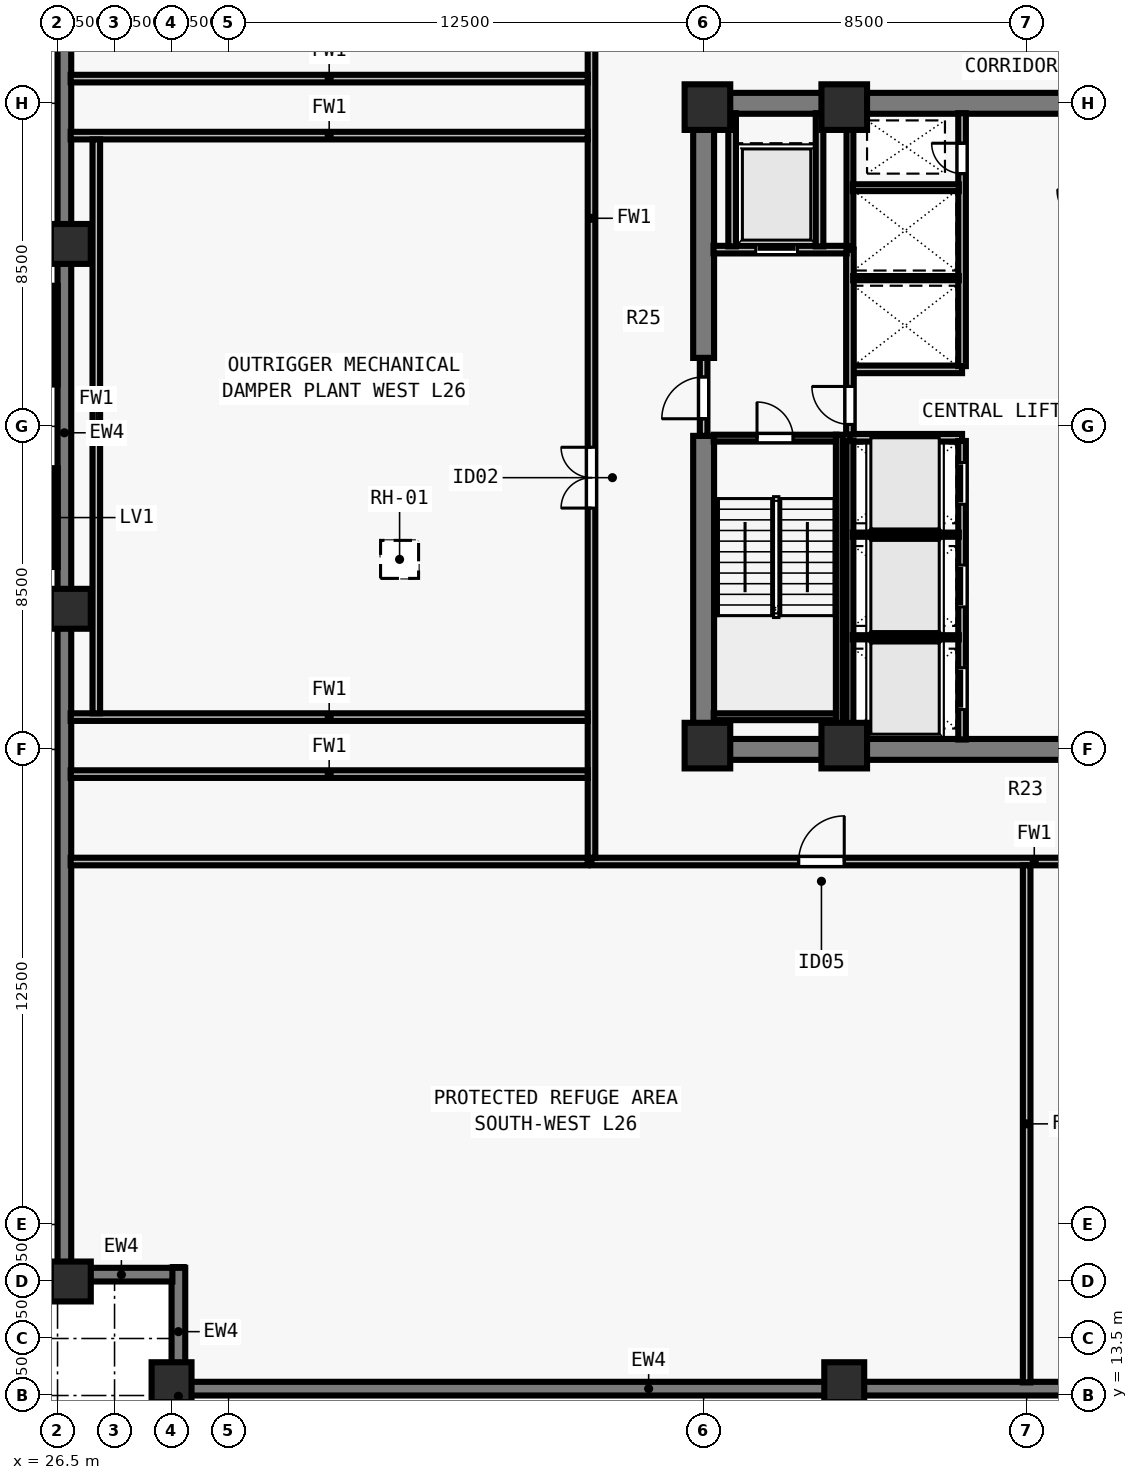
"""IFC4 building model, lengths in metres.
Left out: names, types, materials, properties, quantities, classifications, styles, units other than length and angle.
Written with IfcOpenShell. Run it as: python <this file> out.ifc"""

import sys

from ifc_helpers import new_model, si_unit, direction, frame, frame_2d, origin, origin_2d, place, context, subcontext, project, spatial, rectangle, extrude, element, fill, save


model = new_model("IFC4")
c1 = context("Model", 3, precision=1e-05, world=origin(), true_north=direction((0.0, 1.0)))
c2 = subcontext(c1, "Body", "Model", "MODEL_VIEW")
j1 = project(units=[si_unit("LENGTHUNIT", "METRE"), si_unit("PLANEANGLEUNIT", "RADIAN")], contexts=[c1])
p1 = place(None, origin())
s1 = spatial("IfcSite", under=j1, at=p1, CompositionType="ELEMENT")
p2 = place(p1, origin())
s2 = spatial("IfcBuilding", under=s1, at=p2, CompositionType="ELEMENT")
p3 = place(p2, frame((0.0, 0.0, 97.0)))
s3 = spatial("IfcBuildingStorey", under=s2, at=p3, CompositionType="ELEMENT", Elevation=97.0)
for number, where, z_axis, x_axis in (
    (1, (43.6, 30.6, 0.0), (0.0, 0.0, 1.0), (1.0, 0.0, 0.0)),
    (2, (47.2, 30.6, 0.0), (0.0, 0.0, 1.0), (1.0, 0.0, 0.0)),
    (3, (43.6, 47.4, 0.0), (0.0, 0.0, 1.0), (1.0, 0.0, 0.0)),
    (4, (47.2, 47.4, 0.0), (0.0, 0.0, 1.0), (1.0, 0.0, 0.0)),
):
    element("IfcColumn", number, at=place(p3, frame(where, z_axis=z_axis, x_axis=x_axis)), inside=s3, PredefinedType="COLUMN", context=c2, shape_type="SweptSolid", body=[
        extrude(rectangle(XDim=1.2, YDim=1.2, at=origin_2d()), origin(), (0.0, 0.0, 1.0), 4.5),
    ])
for number, where, z_axis, x_axis in (
    (5, (29.5, 13.85, 0.0), (0.0, 0.0, 1.0), (1.0, 0.0, 0.0)),
    (6, (47.2, 13.85, 0.0), (0.0, 0.0, 1.0), (1.0, 0.0, 0.0)),
    (7, (26.85, 43.8, 0.0), (0.0, 0.0, 1.0), (0.0, 1.0, 0.0)),
    (8, (26.85, 34.2, 0.0), (0.0, 0.0, 1.0), (0.0, 1.0, 0.0)),
    (9, (26.85, 16.5, 0.0), (0.0, 0.0, 1.0), (0.0, 1.0, 0.0)),
):
    element("IfcColumn", number, at=place(p3, frame(where, z_axis=z_axis, x_axis=x_axis)), inside=s3, PredefinedType="COLUMN", context=c2, shape_type="SweptSolid", body=[
        extrude(rectangle(XDim=1.05, YDim=1.05, at=origin_2d()), origin(), (0.0, 0.0, 1.0), 4.5),
    ])
p4 = place(p3, frame((29.68, 13.5, 0.0), z_axis=(0.0, 0.0, 1.0), x_axis=(0.0, 1.0, 0.0)))
e10 = element("IfcWall", 10, at=p4, inside=s3, PredefinedType="SOLIDWALL", context=c2, shape_type="SweptSolid", body=[
    extrude(rectangle(XDim=3.36, YDim=0.36, at=frame_2d((1.68, 0.0))), origin(), (0.0, 0.0, 1.0), 4.28),
])
p5 = place(p3, frame((29.522, 16.68, 0.0), z_axis=(0.0, 0.0, 1.0), x_axis=(-1.0, 0.0, 0.0)))
e11 = element("IfcWall", 11, at=p5, inside=s3, PredefinedType="SOLIDWALL", context=c2, shape_type="SweptSolid", body=[
    extrude(rectangle(XDim=2.684, YDim=0.36, at=frame_2d((1.342, 0.0))), origin(), (0.0, 0.0, 1.0), 4.28),
])
p6 = place(p3, frame((26.68, 16.5, 0.0), z_axis=(0.0, 0.0, 1.0), x_axis=(0.0, 1.0, 0.0)))
e12 = element("IfcWall", 12, at=p6, inside=s3, PredefinedType="SOLIDWALL", context=c2, shape_type="SweptSolid", body=[
    extrude(rectangle(XDim=44.662, YDim=0.36, at=frame_2d((22.331, 0.0))), origin(), (0.0, 0.0, 1.0), 4.28),
])
p7 = place(p3, frame((74.5, 13.68, 0.0), z_axis=(0.0, 0.0, 1.0), x_axis=(-1.0, 0.0, 0.0)))
e13 = element("IfcWall", 13, at=p7, inside=s3, PredefinedType="SOLIDWALL", context=c2, shape_type="SweptSolid", body=[
    extrude(rectangle(XDim=44.662, YDim=0.36, at=frame_2d((22.331, 0.0))), origin(), (0.0, 0.0, 1.0), 4.28),
])
p8 = place(p7, frame((18.731, 0.0, 0.8)))
e14 = element("IfcOpeningElement", 14, at=p8, cuts=e13, PredefinedType="OPENING", context=c2, shape_type="SweptSolid", body=[
    extrude(rectangle(XDim=1.35, YDim=1.53, at=frame_2d((0.675, 0.765))), frame((0.0, 0.19, 0.0), z_axis=(0.0, -1.0, 0.0), x_axis=(1.0, 0.0, 0.0)), (0.0, 0.0, 1.0), 0.38),
])
for number, where, z_axis, x_axis in (
    (15, (43.225, 30.5, 0.0), (0.0, 0.0, 1.0), (1.0, 0.0, 0.0)),
    (16, (43.225, 47.5, 0.0), (0.0, 0.0, 1.0), (1.0, 0.0, 0.0)),
):
    element("IfcWall", number, at=place(p3, frame(where, z_axis=z_axis, x_axis=x_axis)), inside=s3, PredefinedType="SHEAR", context=c2, shape_type="SweptSolid", body=[
        extrude(rectangle(XDim=17.55, YDim=0.55, at=frame_2d((8.775, 0.0))), origin(), (0.0, 0.0, 1.0), 4.28),
    ])
p9 = place(p3, frame((43.5, 30.765, 0.0), z_axis=(0.0, 0.0, 1.0), x_axis=(0.0, 1.0, 0.0)))
e17 = element("IfcWall", 17, at=p9, inside=s3, PredefinedType="SHEAR", context=c2, shape_type="SweptSolid", body=[
    extrude(rectangle(XDim=7.985, YDim=0.55, at=frame_2d((3.993, 0.0))), origin(), (0.0, 0.0, 1.0), 4.28),
])
p10 = place(p3, frame((43.5, 40.8, 0.0), z_axis=(0.0, 0.0, 1.0), x_axis=(0.0, 1.0, 0.0)))
e18 = element("IfcWall", 18, at=p10, inside=s3, PredefinedType="SHEAR", context=c2, shape_type="SweptSolid", body=[
    extrude(rectangle(XDim=6.435, YDim=0.55, at=frame_2d((3.218, 0.0))), origin(), (0.0, 0.0, 1.0), 4.28),
])
for number, where, z_axis, x_axis in (
    (19, (47.35, 38.7, 0.0), (0.0, 0.0, 1.0), (1.0, 0.0, 0.0)),
    (20, (47.35, 40.5, 0.0), (0.0, 0.0, 1.0), (1.0, 0.0, 0.0)),
):
    element("IfcWall", number, at=place(p3, frame(where, z_axis=z_axis, x_axis=x_axis)), inside=s3, PredefinedType="SOLIDWALL", context=c2, shape_type="SweptSolid", body=[
        extrude(rectangle(XDim=2.95, YDim=0.2, at=frame_2d((1.475, 0.0))), origin(), (0.0, 0.0, 1.0), 4.28),
    ])
p11 = place(p3, frame((50.3, 30.76, 0.0), z_axis=(0.0, 0.0, 1.0), x_axis=(0.0, 1.0, 0.0)))
e21 = element("IfcWall", 21, at=p11, inside=s3, PredefinedType="SOLIDWALL", context=c2, shape_type="SweptSolid", body=[
    extrude(rectangle(XDim=7.855, YDim=0.2, at=frame_2d((3.927, 0.0))), origin(), (0.0, 0.0, 1.0), 4.28),
])
p12 = place(p11, frame((0.79, 0.0, 0.0)))
e22 = element("IfcOpeningElement", 22, at=p12, cuts=e21, PredefinedType="OPENING", context=c2, shape_type="SweptSolid", body=[
    extrude(rectangle(XDim=1.1, YDim=2.2, at=frame_2d((0.55, 1.1))), frame((0.0, 0.11, 0.0), z_axis=(0.0, -1.0, 0.0), x_axis=(1.0, 0.0, 0.0)), (0.0, 0.0, 1.0), 0.22),
])
p13 = place(p11, frame((3.49, 0.0, 0.0)))
e23 = element("IfcOpeningElement", 23, at=p13, cuts=e21, PredefinedType="OPENING", context=c2, shape_type="SweptSolid", body=[
    extrude(rectangle(XDim=1.1, YDim=2.2, at=frame_2d((0.55, 1.1))), frame((0.0, 0.11, 0.0), z_axis=(0.0, -1.0, 0.0), x_axis=(1.0, 0.0, 0.0)), (0.0, 0.0, 1.0), 0.22),
])
p14 = place(p11, frame((6.19, 0.0, 0.0)))
e24 = element("IfcOpeningElement", 24, at=p14, cuts=e21, PredefinedType="OPENING", context=c2, shape_type="SweptSolid", body=[
    extrude(rectangle(XDim=1.1, YDim=2.2, at=frame_2d((0.55, 1.1))), frame((0.0, 0.11, 0.0), z_axis=(0.0, -1.0, 0.0), x_axis=(1.0, 0.0, 0.0)), (0.0, 0.0, 1.0), 0.22),
])
p15 = place(p3, frame((50.3, 40.585, 0.0), z_axis=(0.0, 0.0, 1.0), x_axis=(0.0, 1.0, 0.0)))
e25 = element("IfcWall", 25, at=p15, inside=s3, PredefinedType="SOLIDWALL", context=c2, shape_type="SweptSolid", body=[
    extrude(rectangle(XDim=6.655, YDim=0.2, at=frame_2d((3.328, 0.0))), origin(), (0.0, 0.0, 1.0), 4.28),
])
p16 = place(p15, frame((5.065, 0.0, 0.0)))
e26 = element("IfcOpeningElement", 26, at=p16, cuts=e25, PredefinedType="OPENING", context=c2, shape_type="SweptSolid", body=[
    extrude(rectangle(XDim=0.8, YDim=2.08, at=frame_2d((0.4, 1.04))), frame((0.0, 0.11, 0.0), z_axis=(0.0, -1.0, 0.0), x_axis=(1.0, 0.0, 0.0)), (0.0, 0.0, 1.0), 0.22),
])
p17 = place(p3, frame((43.5, 38.75, 0.0), z_axis=(0.0, 0.0, 1.0), x_axis=(0.0, 1.0, 0.0)))
e27 = element("IfcWall", 27, at=p17, inside=s3, PredefinedType="SOLIDWALL", context=c2, shape_type="SweptSolid", body=[
    extrude(rectangle(XDim=2.05, YDim=0.2, at=frame_2d((1.025, 0.0))), origin(), (0.0, 0.0, 1.0), 4.28),
])
p18 = place(p17, frame((0.45, 0.0, 0.0)))
e28 = element("IfcOpeningElement", 28, at=p18, cuts=e27, PredefinedType="OPENING", context=c2, shape_type="SweptSolid", body=[
    extrude(rectangle(XDim=1.1, YDim=2.15, at=frame_2d((0.55, 1.075))), frame((0.0, 0.11, 0.0), z_axis=(0.0, -1.0, 0.0), x_axis=(1.0, 0.0, 0.0)), (0.0, 0.0, 1.0), 0.22),
])
p19 = place(p3, frame((47.35, 38.785, 0.0), z_axis=(0.0, 0.0, 1.0), x_axis=(0.0, 1.0, 0.0)))
e29 = element("IfcWall", 29, at=p19, inside=s3, PredefinedType="SOLIDWALL", context=c2, shape_type="SweptSolid", body=[
    extrude(rectangle(XDim=4.865, YDim=0.2, at=frame_2d((2.433, 0.0))), origin(), (0.0, 0.0, 1.0), 4.28),
])
p20 = place(p19, frame((0.265, 0.0, 0.0)))
e30 = element("IfcOpeningElement", 30, at=p20, cuts=e29, PredefinedType="OPENING", context=c2, shape_type="SweptSolid", body=[
    extrude(rectangle(XDim=1.0, YDim=2.15, at=frame_2d((0.5, 1.075))), frame((0.0, 0.11, 0.0), z_axis=(0.0, -1.0, 0.0), x_axis=(1.0, 0.0, 0.0)), (0.0, 0.0, 1.0), 0.22),
])
p21 = place(p3, frame((43.76, 43.65, 0.0), z_axis=(0.0, 0.0, 1.0), x_axis=(1.0, 0.0, 0.0)))
e31 = element("IfcWall", 31, at=p21, inside=s3, PredefinedType="SOLIDWALL", context=c2, shape_type="SweptSolid", body=[
    extrude(rectangle(XDim=3.505, YDim=0.2, at=frame_2d((1.752, 0.0))), origin(), (0.0, 0.0, 1.0), 4.28),
])
p22 = place(p21, frame((1.11, 0.0, 0.0)))
e32 = element("IfcOpeningElement", 32, at=p22, cuts=e31, PredefinedType="OPENING", context=c2, shape_type="SweptSolid", body=[
    extrude(rectangle(XDim=1.1, YDim=2.2, at=frame_2d((0.55, 1.1))), frame((0.0, 0.11, 0.0), z_axis=(0.0, -1.0, 0.0), x_axis=(1.0, 0.0, 0.0)), (0.0, 0.0, 1.0), 0.22),
])
for number, where, z_axis, x_axis in (
    (33, (46.55, 43.735, 0.0), (0.0, 0.0, 1.0), (0.0, 1.0, 0.0)),
    (34, (44.25, 43.735, 0.0), (0.0, 0.0, 1.0), (0.0, 1.0, 0.0)),
):
    element("IfcWall", number, at=place(p3, frame(where, z_axis=z_axis, x_axis=x_axis)), inside=s3, PredefinedType="SOLIDWALL", context=c2, shape_type="SweptSolid", body=[
        extrude(rectangle(XDim=3.505, YDim=0.2, at=frame_2d((1.752, 0.0))), origin(), (0.0, 0.0, 1.0), 4.28),
    ])
p23 = place(p3, frame((47.35, 30.76, 0.0), z_axis=(0.0, 0.0, 1.0), x_axis=(0.0, 1.0, 0.0)))
e35 = element("IfcWall", 35, at=p23, inside=s3, PredefinedType="SOLIDWALL", context=c2, shape_type="SweptSolid", body=[
    extrude(rectangle(XDim=7.855, YDim=0.18, at=frame_2d((3.927, 0.0))), origin(), (0.0, 0.0, 1.0), 4.28),
])
for number, where, z_axis, x_axis in (
    (36, (47.425, 33.45, 0.0), (0.0, 0.0, 1.0), (1.0, 0.0, 0.0)),
    (37, (47.425, 36.15, 0.0), (0.0, 0.0, 1.0), (1.0, 0.0, 0.0)),
):
    element("IfcWall", number, at=place(p3, frame(where, z_axis=z_axis, x_axis=x_axis)), inside=s3, PredefinedType="PARTITIONING", context=c2, shape_type="SweptSolid", body=[
        extrude(rectangle(XDim=2.79, YDim=0.11, at=frame_2d((1.395, 0.0))), origin(), (0.0, 0.0, 1.0), 4.28),
    ])
p24 = place(p3, frame((47.35, 43.735, 0.0), z_axis=(0.0, 0.0, 1.0), x_axis=(0.0, 1.0, 0.0)))
e38 = element("IfcWall", 38, at=p24, inside=s3, PredefinedType="SOLIDWALL", context=c2, shape_type="SweptSolid", body=[
    extrude(rectangle(XDim=3.505, YDim=0.18, at=frame_2d((1.752, 0.0))), origin(), (0.0, 0.0, 1.0), 4.28),
])
p25 = place(p3, frame((47.435, 42.9, 0.0), z_axis=(0.0, 0.0, 1.0), x_axis=(1.0, 0.0, 0.0)))
e39 = element("IfcWall", 39, at=p25, inside=s3, PredefinedType="PARTITIONING", context=c2, shape_type="SweptSolid", body=[
    extrude(rectangle(XDim=2.78, YDim=0.11, at=frame_2d((1.39, 0.0))), origin(), (0.0, 0.0, 1.0), 4.28),
])
p26 = place(p3, frame((47.425, 45.28, 0.0), z_axis=(0.0, 0.0, 1.0), x_axis=(1.0, 0.0, 0.0)))
e40 = element("IfcWall", 40, at=p26, inside=s3, PredefinedType="SOLIDWALL", context=c2, shape_type="SweptSolid", body=[
    extrude(rectangle(XDim=2.79, YDim=0.18, at=frame_2d((1.395, 0.0))), origin(), (0.0, 0.0, 1.0), 4.28),
])
p27 = place(p3, frame((40.55, 27.55, 0.0), z_axis=(0.0, 0.0, 1.0), x_axis=(1.0, 0.0, 0.0)))
e41 = element("IfcWall", 41, at=p27, inside=s3, PredefinedType="SOLIDWALL", context=c2, shape_type="SweptSolid", body=[
    extrude(rectangle(XDim=22.9, YDim=0.2, at=frame_2d((11.45, 0.0))), origin(), (0.0, 0.0, 1.0), 4.28),
])
p28 = place(p27, frame((5.45, 0.0, 0.0)))
e42 = element("IfcOpeningElement", 42, at=p28, cuts=e41, PredefinedType="OPENING", context=c2, shape_type="SweptSolid", body=[
    extrude(rectangle(XDim=1.2, YDim=2.15, at=frame_2d((0.6, 1.075))), frame((0.0, 0.11, 0.0), z_axis=(0.0, -1.0, 0.0), x_axis=(1.0, 0.0, 0.0)), (0.0, 0.0, 1.0), 0.22),
])
p29 = place(p27, frame((16.65, 0.0, 0.0)))
e43 = element("IfcOpeningElement", 43, at=p29, cuts=e41, PredefinedType="OPENING", context=c2, shape_type="SweptSolid", body=[
    extrude(rectangle(XDim=1.2, YDim=2.15, at=frame_2d((0.6, 1.075))), frame((0.0, 0.11, 0.0), z_axis=(0.0, -1.0, 0.0), x_axis=(1.0, 0.0, 0.0)), (0.0, 0.0, 1.0), 0.22),
])
p30 = place(p3, frame((40.55, 27.65, 0.0), z_axis=(0.0, 0.0, 1.0), x_axis=(0.0, 1.0, 0.0)))
e44 = element("IfcWall", 44, at=p30, inside=s3, PredefinedType="SOLIDWALL", context=c2, shape_type="SweptSolid", body=[
    extrude(rectangle(XDim=22.7, YDim=0.2, at=frame_2d((11.35, 0.0))), origin(), (0.0, 0.0, 1.0), 4.28),
])
p31 = place(p30, frame((9.2, 0.0, 0.0)))
e45 = element("IfcOpeningElement", 45, at=p31, cuts=e44, PredefinedType="OPENING", context=c2, shape_type="SweptSolid", body=[
    extrude(rectangle(XDim=1.6, YDim=2.2, at=frame_2d((0.8, 1.1))), frame((0.0, 0.11, 0.0), z_axis=(0.0, -1.0, 0.0), x_axis=(1.0, 0.0, 0.0)), (0.0, 0.0, 1.0), 0.22),
])
p32 = place(p3, frame((26.845, 29.85, 0.0), z_axis=(0.0, 0.0, 1.0), x_axis=(1.0, 0.0, 0.0)))
e46 = element("IfcWall", 46, at=p32, inside=s3, PredefinedType="SOLIDWALL", context=c2, shape_type="SweptSolid", body=[
    extrude(rectangle(XDim=13.605, YDim=0.2, at=frame_2d((6.802, 0.0))), origin(), (0.0, 0.0, 1.0), 4.28),
])
for number, where, z_axis, x_axis in (
    (47, (26.845, 31.35, 0.0), (0.0, 0.0, 1.0), (1.0, 0.0, 0.0)),
    (48, (26.845, 46.65, 0.0), (0.0, 0.0, 1.0), (1.0, 0.0, 0.0)),
):
    element("IfcWall", number, at=place(p3, frame(where, z_axis=z_axis, x_axis=x_axis)), inside=s3, PredefinedType="SOLIDWALL", context=c2, shape_type="SweptSolid", body=[
        extrude(rectangle(XDim=13.605, YDim=0.2, at=frame_2d((6.802, 0.0))), origin(), (0.0, 0.0, 1.0), 2.455),
    ])
p33 = place(p3, frame((26.845, 48.15, 0.0), z_axis=(0.0, 0.0, 1.0), x_axis=(1.0, 0.0, 0.0)))
e49 = element("IfcWall", 49, at=p33, inside=s3, PredefinedType="SOLIDWALL", context=c2, shape_type="SweptSolid", body=[
    extrude(rectangle(XDim=13.605, YDim=0.2, at=frame_2d((6.802, 0.0))), origin(), (0.0, 0.0, 1.0), 4.28),
])
p34 = place(p3, frame((27.52, 31.45, 0.0), z_axis=(0.0, 0.0, 1.0), x_axis=(0.0, 1.0, 0.0)))
e50 = element("IfcWall", 50, at=p34, inside=s3, PredefinedType="SOLIDWALL", context=c2, shape_type="SweptSolid", body=[
    extrude(rectangle(XDim=15.1, YDim=0.2, at=frame_2d((7.55, 0.0))), origin(), (0.0, 0.0, 1.0), 4.28),
])
for number, where, z_axis, x_axis in (
    (51, (52.0, 13.845, 0.0), (0.0, 0.0, 1.0), (0.0, 1.0, 0.0)),
    (52, (26.845, 27.55, 0.0), (0.0, 0.0, 1.0), (1.0, 0.0, 0.0)),
):
    element("IfcWall", number, at=place(p3, frame(where, z_axis=z_axis, x_axis=x_axis)), inside=s3, PredefinedType="SOLIDWALL", context=c2, shape_type="SweptSolid", body=[
        extrude(rectangle(XDim=13.605, YDim=0.2, at=frame_2d((6.802, 0.0))), origin(), (0.0, 0.0, 1.0), 3.849),
    ])
p35 = place(p3, frame((43.765, 38.69, 0.0), z_axis=(0.0, 0.0, 1.0), x_axis=(1.0, 0.0, 0.0)))
e53 = element("IfcWall", 53, at=p35, inside=s3, PredefinedType="SOLIDWALL", context=c2, shape_type="SweptSolid", body=[
    extrude(rectangle(XDim=3.23, YDim=0.18, at=frame_2d((1.615, 0.0))), origin(), (0.0, 0.0, 1.0), 4.28),
])
p36 = place(p35, frame((1.14, 0.0, 0.0)))
e54 = element("IfcOpeningElement", 54, at=p36, cuts=e53, PredefinedType="OPENING", context=c2, shape_type="SweptSolid", body=[
    extrude(rectangle(XDim=0.95, YDim=2.15, at=frame_2d((0.475, 1.075))), frame((0.0, 0.1, 0.0), z_axis=(0.0, -1.0, 0.0), x_axis=(1.0, 0.0, 0.0)), (0.0, 0.0, 1.0), 0.2),
])
p37 = place(p3, frame((43.765, 31.36, 0.0), z_axis=(0.0, 0.0, 1.0), x_axis=(1.0, 0.0, 0.0)))
e55 = element("IfcWall", 55, at=p37, inside=s3, PredefinedType="SOLIDWALL", context=c2, shape_type="SweptSolid", body=[
    extrude(rectangle(XDim=3.23, YDim=0.18, at=frame_2d((1.615, 0.0))), origin(), (0.0, 0.0, 1.0), 4.28),
])
p38 = place(p3, frame((47.07, 38.78, 0.0), z_axis=(0.0, 0.0, 1.0), x_axis=(0.0, -1.0, 0.0)))
e56 = element("IfcWall", 56, at=p38, inside=s3, PredefinedType="SOLIDWALL", context=c2, shape_type="SweptSolid", body=[
    extrude(rectangle(XDim=8.017, YDim=0.18, at=frame_2d((4.009, 0.0))), origin(), (0.0, 0.0, 1.0), 4.28),
])
p39 = place(p3, frame((0.0, 0.0, -0.26)))
p40 = place(p39, frame((35.5, 35.5, 0.0)))
p41 = place(p40, frame((0.0, 0.0, 0.21)))
e57 = element("IfcDoor", 57, at=p41, inside=s3, OperationType="SINGLE_SWING_LEFT", PredefinedType="TRAPDOOR", context=c2, shape_type="SweptSolid", body=[
    extrude(rectangle(XDim=1.0, YDim=1.0, at=origin_2d()), origin(), (0.0, 0.0, 1.0), 0.05),
])
p42 = place(p18, origin())
e58 = element("IfcDoor", 58, at=p42, inside=s3, OperationType="SINGLE_SWING_LEFT", PredefinedType="DOOR", context=c2, shape_type="SweptSolid", body=[
    extrude(rectangle(XDim=1.1, YDim=2.15, at=frame_2d((0.55, 1.075))), frame((0.0, 0.025, 0.0), z_axis=(0.0, -1.0, 0.0), x_axis=(1.0, 0.0, 0.0)), (0.0, 0.0, 1.0), 0.05),
])
fill(e28, e58)
p43 = place(p20, origin())
e59 = element("IfcDoor", 59, at=p43, inside=s3, OperationType="SINGLE_SWING_RIGHT", PredefinedType="DOOR", context=c2, shape_type="SweptSolid", body=[
    extrude(rectangle(XDim=1.0, YDim=2.15, at=frame_2d((0.5, 1.075))), frame((0.0, 0.025, 0.0), z_axis=(0.0, -1.0, 0.0), x_axis=(1.0, 0.0, 0.0)), (0.0, 0.0, 1.0), 0.05),
])
fill(e30, e59)
p44 = place(p22, origin())
e60 = element("IfcDoor", 60, at=p44, inside=s3, OperationType="SLIDING_TO_LEFT", PredefinedType="DOOR", context=c2, shape_type="SweptSolid", body=[
    extrude(rectangle(XDim=1.1, YDim=2.2, at=frame_2d((0.55, 1.1))), frame((0.0, 0.025, 0.0), z_axis=(0.0, -1.0, 0.0), x_axis=(1.0, 0.0, 0.0)), (0.0, 0.0, 1.0), 0.05),
])
fill(e32, e60)
p45 = place(p12, origin())
e61 = element("IfcDoor", 61, at=p45, inside=s3, OperationType="SLIDING_TO_LEFT", PredefinedType="DOOR", context=c2, shape_type="SweptSolid", body=[
    extrude(rectangle(XDim=1.1, YDim=2.2, at=frame_2d((0.55, 1.1))), frame((0.0, 0.025, 0.0), z_axis=(0.0, -1.0, 0.0), x_axis=(1.0, 0.0, 0.0)), (0.0, 0.0, 1.0), 0.05),
])
fill(e22, e61)
p46 = place(p13, origin())
e62 = element("IfcDoor", 62, at=p46, inside=s3, OperationType="SLIDING_TO_LEFT", PredefinedType="DOOR", context=c2, shape_type="SweptSolid", body=[
    extrude(rectangle(XDim=1.1, YDim=2.2, at=frame_2d((0.55, 1.1))), frame((0.0, 0.025, 0.0), z_axis=(0.0, -1.0, 0.0), x_axis=(1.0, 0.0, 0.0)), (0.0, 0.0, 1.0), 0.05),
])
fill(e23, e62)
p47 = place(p14, origin())
e63 = element("IfcDoor", 63, at=p47, inside=s3, OperationType="SLIDING_TO_LEFT", PredefinedType="DOOR", context=c2, shape_type="SweptSolid", body=[
    extrude(rectangle(XDim=1.1, YDim=2.2, at=frame_2d((0.55, 1.1))), frame((0.0, 0.025, 0.0), z_axis=(0.0, -1.0, 0.0), x_axis=(1.0, 0.0, 0.0)), (0.0, 0.0, 1.0), 0.05),
])
fill(e24, e63)
p48 = place(p16, origin())
e64 = element("IfcDoor", 64, at=p48, inside=s3, OperationType="SINGLE_SWING_RIGHT", PredefinedType="DOOR", context=c2, shape_type="SweptSolid", body=[
    extrude(rectangle(XDim=0.8, YDim=2.08, at=frame_2d((0.4, 1.04))), frame((0.0, 0.025, 0.0), z_axis=(0.0, -1.0, 0.0), x_axis=(1.0, 0.0, 0.0)), (0.0, 0.0, 1.0), 0.05),
])
fill(e26, e64)
p49 = place(p28, origin())
e65 = element("IfcDoor", 65, at=p49, inside=s3, OperationType="SINGLE_SWING_RIGHT", PredefinedType="DOOR", context=c2, shape_type="SweptSolid", body=[
    extrude(rectangle(XDim=1.2, YDim=2.15, at=frame_2d((0.6, 1.075))), frame((0.0, 0.025, 0.0), z_axis=(0.0, -1.0, 0.0), x_axis=(1.0, 0.0, 0.0)), (0.0, 0.0, 1.0), 0.05),
])
fill(e42, e65)
p50 = place(p31, origin())
e66 = element("IfcDoor", 66, at=p50, inside=s3, OperationType="DOUBLE_DOOR_SINGLE_SWING", PredefinedType="DOOR", context=c2, shape_type="SweptSolid", body=[
    extrude(rectangle(XDim=1.6, YDim=2.2, at=frame_2d((0.8, 1.1))), frame((0.0, 0.025, 0.0), z_axis=(0.0, -1.0, 0.0), x_axis=(1.0, 0.0, 0.0)), (0.0, 0.0, 1.0), 0.05),
])
fill(e45, e66)
p51 = place(p36, origin())
e67 = element("IfcDoor", 67, at=p51, inside=s3, OperationType="SINGLE_SWING_LEFT", PredefinedType="DOOR", context=c2, shape_type="SweptSolid", body=[
    extrude(rectangle(XDim=0.95, YDim=2.15, at=frame_2d((0.475, 1.075))), frame((0.0, 0.025, 0.0), z_axis=(0.0, -1.0, 0.0), x_axis=(1.0, 0.0, 0.0)), (0.0, 0.0, 1.0), 0.05),
])
fill(e54, e67)
save(model, sys.argv[1])
